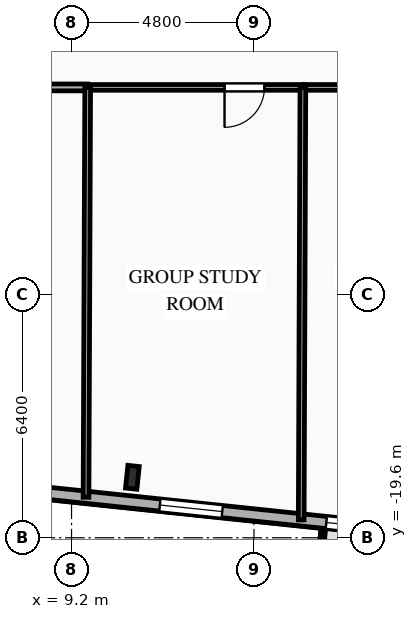
"""IFC4 building model, lengths in metres.
Left out: names, types, materials, properties, quantities, classifications, styles, units other than length and angle.
Written with IfcOpenShell. Run it as: python <this file> out.ifc"""

import sys

from ifc_helpers import new_model, si_unit, direction, frame, frame_2d, origin, origin_2d, place, context, subcontext, project, spatial, rectangle, i_section, extrude, element, fill, save


model = new_model("IFC4")
c1 = context("Model", 3, precision=1e-05, world=origin(), true_north=direction((0.0, 1.0)))
c2 = subcontext(c1, "Body", "Model", "MODEL_VIEW")
j1 = project(units=[si_unit("LENGTHUNIT", "METRE"), si_unit("PLANEANGLEUNIT", "RADIAN")], contexts=[c1])
p1 = place(None, origin())
s1 = spatial("IfcSite", under=j1, at=p1, CompositionType="ELEMENT")
p2 = place(p1, origin())
s2 = spatial("IfcBuilding", under=s1, at=p2, CompositionType="ELEMENT")
p3 = place(p2, frame((0.0, 0.0, 186.35)))
s3 = spatial("IfcBuildingStorey", under=s2, at=p3, CompositionType="ELEMENT", Elevation=186.35)
p4 = place(p3, frame((10.801, -18.009, 0.0), z_axis=(0.0, 0.0, 1.0), x_axis=(0.994521895368, -0.104528463268, 0.0)))
e1 = element("IfcColumn", 1, at=p4, inside=s3, PredefinedType="COLUMN", context=c2, shape_type="SweptSolid", body=[
    extrude(i_section(OverallWidth=0.3, OverallDepth=0.6, WebThickness=0.015, FlangeThickness=0.03, FilletRadius=0.027, at=origin_2d()), origin(), (0.0, 0.0, 1.0), 3.35),
])
p5 = place(p3, frame((18.756, -19.498, 0.0), z_axis=(0.0, 0.0, 1.0), x_axis=(-0.994522060044, 0.104526896475, 0.0)))
e2 = element("IfcWall", 2, at=p5, inside=s3, PredefinedType="SOLIDWALL", context=c2, shape_type="SweptSolid", body=[
    extrude(rectangle(XDim=45.8, YDim=0.32, at=frame_2d((22.9, 0.0))), origin(), (0.0, 0.0, 1.0), 3.04),
])
p6 = place(p5, frame((1.217, 0.0, 0.85)))
e3 = element("IfcOpeningElement", 3, at=p6, cuts=e2, PredefinedType="OPENING", context=c2, shape_type="SweptSolid", body=[
    extrude(rectangle(XDim=1.65, YDim=1.85, at=frame_2d((0.825, 0.925))), frame((0.0, 0.17, 0.0), z_axis=(0.0, -1.0, 0.0), x_axis=(1.0, 0.0, 0.0)), (0.0, 0.0, 1.0), 0.34),
])
p7 = place(p5, frame((5.621, 0.0, 0.85)))
e4 = element("IfcOpeningElement", 4, at=p7, cuts=e2, PredefinedType="OPENING", context=c2, shape_type="SweptSolid", body=[
    extrude(rectangle(XDim=1.65, YDim=1.85, at=frame_2d((0.825, 0.925))), frame((0.0, 0.17, 0.0), z_axis=(0.0, -1.0, 0.0), x_axis=(1.0, 0.0, 0.0)), (0.0, 0.0, 1.0), 0.34),
])
p8 = place(p5, frame((13.433, 0.0, 0.85)))
e5 = element("IfcOpeningElement", 5, at=p8, cuts=e2, PredefinedType="OPENING", context=c2, shape_type="SweptSolid", body=[
    extrude(rectangle(XDim=2.2, YDim=1.85, at=frame_2d((1.1, 0.925))), frame((0.0, 0.17, 0.0), z_axis=(0.0, -1.0, 0.0), x_axis=(1.0, 0.0, 0.0)), (0.0, 0.0, 1.0), 0.34),
])
p9 = place(p5, frame((23.962, 0.0, 0.85)))
e6 = element("IfcOpeningElement", 6, at=p9, cuts=e2, PredefinedType="OPENING", context=c2, shape_type="SweptSolid", body=[
    extrude(rectangle(XDim=2.2, YDim=1.85, at=frame_2d((1.1, 0.925))), frame((0.0, 0.17, 0.0), z_axis=(0.0, -1.0, 0.0), x_axis=(1.0, 0.0, 0.0)), (0.0, 0.0, 1.0), 0.34),
])
p10 = place(p5, frame((34.366, 0.0, 0.85)))
e7 = element("IfcOpeningElement", 7, at=p10, cuts=e2, PredefinedType="OPENING", context=c2, shape_type="SweptSolid", body=[
    extrude(rectangle(XDim=1.65, YDim=1.85, at=frame_2d((0.825, 0.925))), frame((0.0, 0.17, 0.0), z_axis=(0.0, -1.0, 0.0), x_axis=(1.0, 0.0, 0.0)), (0.0, 0.0, 1.0), 0.34),
])
p11 = place(p5, frame((41.892, 0.0, 0.85)))
e8 = element("IfcOpeningElement", 8, at=p11, cuts=e2, PredefinedType="OPENING", context=c2, shape_type="SweptSolid", body=[
    extrude(rectangle(XDim=1.65, YDim=1.85, at=frame_2d((0.825, 0.925))), frame((0.0, 0.17, 0.0), z_axis=(0.0, -1.0, 0.0), x_axis=(1.0, 0.0, 0.0)), (0.0, 0.0, 1.0), 0.34),
])
p12 = place(p3, frame((9.625, -7.75, 0.0), z_axis=(0.0, 0.0, 1.0), x_axis=(-1.0, 0.0, 0.0)))
e9 = element("IfcWall", 9, at=p12, inside=s3, PredefinedType="PARTITIONING", context=c2, shape_type="SweptSolid", body=[
    extrude(rectangle(XDim=8.025, YDim=0.18, at=frame_2d((4.012, 0.0))), origin(), (0.0, 0.0, 1.0), 3.04),
])
p13 = place(p12, frame((5.712, 0.0, 0.0)))
e10 = element("IfcOpeningElement", 10, at=p13, cuts=e9, PredefinedType="OPENING", context=c2, shape_type="SweptSolid", body=[
    extrude(rectangle(XDim=1.0, YDim=2.15, at=frame_2d((0.5, 1.075))), frame((0.0, 0.1, 0.0), z_axis=(0.0, -1.0, 0.0), x_axis=(1.0, 0.0, 0.0)), (0.0, 0.0, 1.0), 0.2),
])
p14 = place(p3, frame((15.288, -7.75, 0.0), z_axis=(0.0, 0.0, 1.0), x_axis=(-1.0, 0.0, 0.0)))
e11 = element("IfcWall", 11, at=p14, inside=s3, PredefinedType="PARTITIONING", context=c2, shape_type="SweptSolid", body=[
    extrude(rectangle(XDim=5.663, YDim=0.15, at=frame_2d((2.831, 0.0))), origin(), (0.0, 0.0, 1.0), 3.04),
])
p15 = place(p14, frame((1.012, 0.0, 0.0)))
e12 = element("IfcOpeningElement", 12, at=p15, cuts=e11, PredefinedType="OPENING", context=c2, shape_type="SweptSolid", body=[
    extrude(rectangle(XDim=1.05, YDim=2.15, at=frame_2d((0.525, 1.075))), frame((0.0, 0.085, 0.0), z_axis=(0.0, -1.0, 0.0), x_axis=(1.0, 0.0, 0.0)), (0.0, 0.0, 1.0), 0.17),
])
p16 = place(p3, frame((20.95, -7.75, 0.0), z_axis=(0.0, 0.0, 1.0), x_axis=(-1.0, 0.0, 0.0)))
e13 = element("IfcWall", 13, at=p16, inside=s3, PredefinedType="PARTITIONING", context=c2, shape_type="SweptSolid", body=[
    extrude(rectangle(XDim=5.662, YDim=0.15, at=frame_2d((2.831, 0.0))), origin(), (0.0, 0.0, 1.0), 3.04),
])
p17 = place(p16, frame((3.601, 0.0, 0.0)))
e14 = element("IfcOpeningElement", 14, at=p17, cuts=e13, PredefinedType="OPENING", context=c2, shape_type="SweptSolid", body=[
    extrude(rectangle(XDim=1.05, YDim=2.15, at=frame_2d((0.525, 1.075))), frame((0.0, 0.085, 0.0), z_axis=(0.0, -1.0, 0.0), x_axis=(1.0, 0.0, 0.0)), (0.0, 0.0, 1.0), 0.17),
])
p18 = place(p3, frame((9.625, -7.75, 0.0), z_axis=(0.0, 0.0, 1.0), x_axis=(-0.004074945792, -0.999991697374, 0.0)))
e15 = element("IfcWall", 15, at=p18, inside=s3, PredefinedType="PARTITIONING", context=c2, shape_type="SweptSolid", body=[
    extrude(rectangle(XDim=10.784, YDim=0.15, at=frame_2d((5.392, 0.0))), origin(), (0.0, 0.0, 1.0), 3.04),
])
p19 = place(p3, frame((15.288, -7.75, 0.0), z_axis=(0.0, 0.0, 1.0), x_axis=(-0.003861886282, -0.999992542889, 0.0)))
e16 = element("IfcWall", 16, at=p19, inside=s3, PredefinedType="PARTITIONING", context=c2, shape_type="SweptSolid", body=[
    extrude(rectangle(XDim=11.379, YDim=0.15, at=frame_2d((5.689, 0.0))), origin(), (0.0, 0.0, 1.0), 3.04),
])
p20 = place(p6, origin())
e17 = element("IfcWindow", 17, at=p20, inside=s3, PartitioningType="SINGLE_PANEL", PredefinedType="WINDOW", context=c2, shape_type="SweptSolid", body=[
    extrude(rectangle(XDim=1.65, YDim=1.85, at=frame_2d((0.825, 0.925))), frame((0.0, 0.03, 0.0), z_axis=(0.0, -1.0, 0.0), x_axis=(1.0, 0.0, 0.0)), (0.0, 0.0, 1.0), 0.06),
])
fill(e3, e17)
p21 = place(p7, origin())
e18 = element("IfcWindow", 18, at=p21, inside=s3, PartitioningType="SINGLE_PANEL", PredefinedType="WINDOW", context=c2, shape_type="SweptSolid", body=[
    extrude(rectangle(XDim=1.65, YDim=1.85, at=frame_2d((0.825, 0.925))), frame((0.0, 0.03, 0.0), z_axis=(0.0, -1.0, 0.0), x_axis=(1.0, 0.0, 0.0)), (0.0, 0.0, 1.0), 0.06),
])
fill(e4, e18)
p22 = place(p15, origin())
e19 = element("IfcDoor", 19, at=p22, inside=s3, OperationType="SINGLE_SWING_RIGHT", PredefinedType="DOOR", context=c2, shape_type="SweptSolid", body=[
    extrude(rectangle(XDim=1.05, YDim=2.15, at=frame_2d((0.525, 1.075))), frame((0.0, 0.025, 0.0), z_axis=(0.0, -1.0, 0.0), x_axis=(1.0, 0.0, 0.0)), (0.0, 0.0, 1.0), 0.05),
])
fill(e12, e19)
save(model, sys.argv[1])
